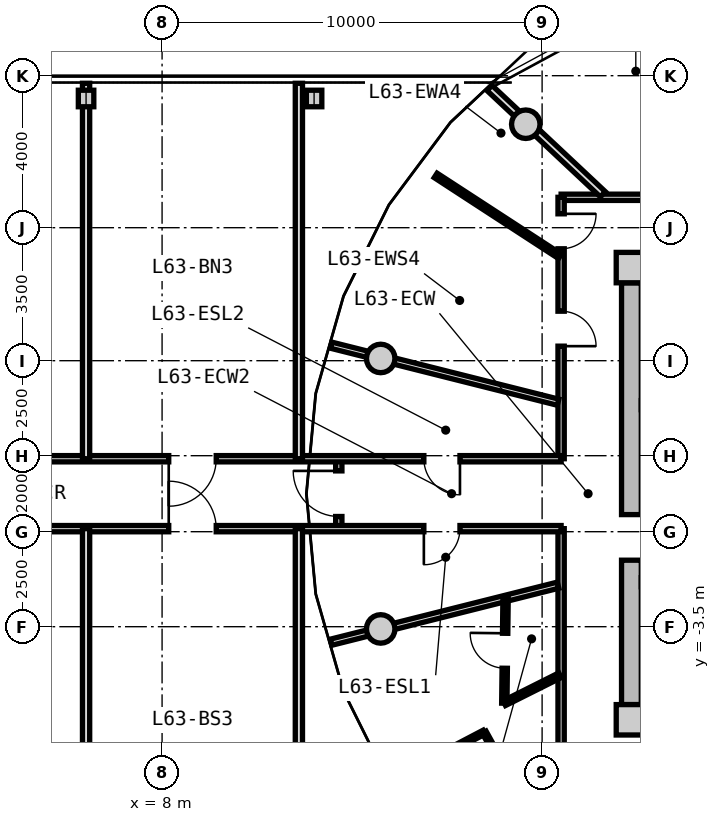
"""IFC4 building model, lengths in metres.
Left out: names, types, materials, properties, quantities, classifications, styles, units other than length and angle.
Written with IfcOpenShell. Run it as: python <this file> out.ifc"""

import sys

from ifc_helpers import new_model, si_unit, direction, frame, frame_2d, origin, origin_2d, place, context, subcontext, project, spatial, rectangle, circle, i_section, extrude, source, transform, mapped, element, fill, save


model = new_model("IFC4")
c1 = context("Model", 3, precision=1e-05, world=origin(), true_north=direction((0.0, 1.0)))
c2 = subcontext(c1, "Body", "Model", "MODEL_VIEW")
j1 = project(units=[si_unit("LENGTHUNIT", "METRE"), si_unit("PLANEANGLEUNIT", "RADIAN")], contexts=[c1])
p1 = place(None, origin())
s1 = spatial("IfcSite", under=j1, at=p1, CompositionType="ELEMENT")
p2 = place(p1, origin())
s2 = spatial("IfcBuilding", under=s1, at=p2, CompositionType="ELEMENT")
p3 = place(p2, frame((0.0, 0.0, 203.8)))
s3 = spatial("IfcBuildingStorey", under=s2, at=p3, CompositionType="ELEMENT", Elevation=203.8)
m1 = source(origin(), c2, "Body", "SweptSolid", [
    extrude(rectangle(XDim=0.8, YDim=0.8, at=origin_2d()), origin(), (0.0, 0.0, 1.0), 4.0),
])
for number, where, z_axis, x_axis in (
    (1, (20.35, -5.95, 0.0), (0.0, 0.0, 1.0), (1.0, 0.0, 0.0)),
    (2, (20.35, 5.95, 0.0), (0.0, 0.0, 1.0), (1.0, 0.0, 0.0)),
):
    element("IfcColumn", number, at=place(p3, frame(where, z_axis=z_axis, x_axis=x_axis)), inside=s3, PredefinedType="COLUMN", context=c2, shape_type="MappedRepresentation", body=[
        mapped(m1, transform((0.0, 0.0, 0.0), x_axis=(1.0, 0.0, 0.0), y_axis=(0.0, 1.0, 0.0), z_axis=(0.0, 0.0, 1.0), scale=1.0)),
    ])
m2 = source(origin(), c2, "Body", "SweptSolid", [
    extrude(rectangle(XDim=11.1, YDim=0.52, at=frame_2d((5.55, 0.0))), origin(), (0.0, 0.0, 1.0), 3.71),
])
p4 = place(p3, frame((20.35, -5.55, 0.0), z_axis=(0.0, 0.0, 1.0), x_axis=(0.0, 1.0, 0.0)))
e3 = element("IfcWall", 3, at=p4, inside=s3, PredefinedType="SHEAR", context=c2, shape_type="MappedRepresentation", body=[
    mapped(m2, transform((0.0, 0.0, 0.0), x_axis=(1.0, 0.0, 0.0), y_axis=(0.0, 1.0, 0.0), z_axis=(0.0, 0.0, 1.0), scale=1.0)),
])
p5 = place(p4, frame((3.8, 0.0, 0.0)))
e4 = element("IfcOpeningElement", 4, at=p5, cuts=e3, PredefinedType="OPENING", context=c2, shape_type="SweptSolid", body=[
    extrude(rectangle(XDim=1.2, YDim=2.15, at=frame_2d((0.6, 1.075))), frame((0.0, 0.27, 0.0), z_axis=(0.0, -1.0, 0.0), x_axis=(1.0, 0.0, 0.0)), (0.0, 0.0, 1.0), 0.54),
])
m3 = source(origin(), c2, "Body", "SweptSolid", [
    extrude(circle(Radius=0.375, at=origin_2d()), origin(), (0.0, 0.0, 1.0), 4.0),
])
for number, where, z_axis, x_axis in (
    (5, (17.57, 9.723, 0.0), (0.0, 0.0, 1.0), (1.0, 0.0, 0.0)),
    (6, (13.753, 3.559, 0.0), (0.0, 0.0, 1.0), (1.0, 0.0, 0.0)),
    (7, (13.753, -3.559, 0.0), (0.0, 0.0, 1.0), (1.0, 0.0, 0.0)),
):
    element("IfcColumn", number, at=place(p3, frame(where, z_axis=z_axis, x_axis=x_axis)), inside=s3, PredefinedType="COLUMN", context=c2, shape_type="MappedRepresentation", body=[
        mapped(m3, transform((0.0, 0.0, 0.0), x_axis=(1.0, 0.0, 0.0), y_axis=(0.0, 1.0, 0.0), z_axis=(0.0, 0.0, 1.0), scale=1.0)),
    ])
m4 = source(origin(), c2, "Body", "SweptSolid", [
    extrude(i_section(OverallWidth=0.407, OverallDepth=0.435, WebThickness=0.024, FlangeThickness=0.039, FilletRadius=0.015, at=origin_2d()), origin(), (0.0, 0.0, 1.0), 4.0),
])
for number, where, z_axis, x_axis in (
    (8, (6.0, 10.4, 0.0), (0.0, 0.0, 1.0), (1.0, 0.0, 0.0)),
    (9, (12.0, 10.4, 0.0), (0.0, 0.0, 1.0), (1.0, 0.0, 0.0)),
):
    element("IfcColumn", number, at=place(p3, frame(where, z_axis=z_axis, x_axis=x_axis)), inside=s3, PredefinedType="COLUMN", context=c2, shape_type="MappedRepresentation", body=[
        mapped(m4, transform((0.0, 0.0, 0.0), x_axis=(1.0, 0.0, 0.0), y_axis=(0.0, 1.0, 0.0), z_axis=(0.0, 0.0, 1.0), scale=1.0)),
    ])
m5 = source(origin(), c2, "Body", "SweptSolid", [
    extrude(rectangle(XDim=8.58, YDim=0.165, at=frame_2d((4.29, 0.0))), origin(), (0.0, 0.0, 1.0), 3.695),
])
p6 = place(p3, frame((18.5, 7.8, 0.0), z_axis=(0.0, 0.0, 1.0), x_axis=(1.0, 0.0, 0.0)))
e10 = element("IfcWall", 10, at=p6, inside=s3, PredefinedType="PARTITIONING", context=c2, shape_type="MappedRepresentation", body=[
    mapped(m5, transform((0.0, 0.0, 0.0), x_axis=(1.0, 0.0, 0.0), y_axis=(0.0, 1.0, 0.0), z_axis=(0.0, 0.0, 1.0), scale=1.0)),
])
p7 = place(p6, frame((2.515, 0.0, 0.0)))
e11 = element("IfcOpeningElement", 11, at=p7, cuts=e10, PredefinedType="OPENING", context=c2, shape_type="SweptSolid", body=[
    extrude(rectangle(XDim=1.05, YDim=2.15, at=frame_2d((0.525, 1.075))), frame((0.0, 0.093, 0.0), z_axis=(0.0, -1.0, 0.0), x_axis=(1.0, 0.0, 0.0)), (0.0, 0.0, 1.0), 0.185),
])
m6 = source(origin(), c2, "Body", "SweptSolid", [
    extrude(rectangle(XDim=6.88, YDim=0.165, at=frame_2d((3.44, 0.0))), origin(), (0.0, 0.0, 1.0), 3.695),
])
p8 = place(p3, frame((18.5, -7.8, 0.0), z_axis=(0.0, 0.0, 1.0), x_axis=(0.0, 1.0, 0.0)))
e12 = element("IfcWall", 12, at=p8, inside=s3, PredefinedType="PARTITIONING", context=c2, shape_type="MappedRepresentation", body=[
    mapped(m6, transform((0.0, 0.0, 0.0), x_axis=(1.0, 0.0, 0.0), y_axis=(0.0, 1.0, 0.0), z_axis=(0.0, 0.0, 1.0), scale=1.0)),
])
p9 = place(p3, frame((18.5, 0.92, 0.0), z_axis=(0.0, 0.0, 1.0), x_axis=(0.0, 1.0, 0.0)))
e13 = element("IfcWall", 13, at=p9, inside=s3, PredefinedType="PARTITIONING", context=c2, shape_type="MappedRepresentation", body=[
    mapped(m6, transform((0.0, 0.0, 0.0), x_axis=(1.0, 0.0, 0.0), y_axis=(0.0, 1.0, 0.0), z_axis=(0.0, 0.0, 1.0), scale=1.0)),
])
p10 = place(p9, frame((5.525, 0.0, 0.0)))
e14 = element("IfcOpeningElement", 14, at=p10, cuts=e13, PredefinedType="OPENING", context=c2, shape_type="SweptSolid", body=[
    extrude(rectangle(XDim=0.92, YDim=2.1, at=frame_2d((0.46, 1.05))), frame((0.0, 0.093, 0.0), z_axis=(0.0, -1.0, 0.0), x_axis=(1.0, 0.0, 0.0)), (0.0, 0.0, 1.0), 0.185),
])
p11 = place(p9, frame((2.962, 0.0, 0.0)))
e15 = element("IfcOpeningElement", 15, at=p11, cuts=e13, PredefinedType="OPENING", context=c2, shape_type="SweptSolid", body=[
    extrude(rectangle(XDim=0.92, YDim=2.1, at=frame_2d((0.46, 1.05))), frame((0.0, 0.093, 0.0), z_axis=(0.0, -1.0, 0.0), x_axis=(1.0, 0.0, 0.0)), (0.0, 0.0, 1.0), 0.185),
])
m7 = source(origin(), c2, "Body", "SweptSolid", [
    extrude(rectangle(XDim=6.157, YDim=0.165, at=frame_2d((3.079, 0.0))), origin(), (0.0, 0.0, 1.0), 3.295),
])
for number, where, z_axis, x_axis in (
    (16, (18.42, 2.407, 0.0), (0.0, 0.0, 1.0), (-0.97, 0.244, 0.0)),
    (17, (18.42, -2.407, 0.0), (0.0, 0.0, 1.0), (-0.97, -0.244, 0.0)),
):
    element("IfcWall", number, at=place(p3, frame(where, z_axis=z_axis, x_axis=x_axis)), inside=s3, PredefinedType="PARTITIONING", context=c2, shape_type="MappedRepresentation", body=[
        mapped(m7, transform((0.0, 0.0, 0.0), x_axis=(1.0, 0.0, 0.0), y_axis=(0.0, 1.0, 0.0), z_axis=(0.0, 0.0, 1.0), scale=1.0)),
    ])
m8 = source(origin(), c2, "Body", "SweptSolid", [
    extrude(rectangle(XDim=4.089, YDim=0.19, at=frame_2d((2.044, 0.0))), origin(), (0.0, 0.0, 1.0), 3.295),
])
p12 = place(p3, frame((19.598, 7.88, 0.0), z_axis=(0.0, 0.0, 1.0), x_axis=(-0.729401273609, 0.684086092577, 0.0)))
e18 = element("IfcWall", 18, at=p12, inside=s3, PredefinedType="PARTITIONING", context=c2, shape_type="MappedRepresentation", body=[
    mapped(m8, transform((0.0, 0.0, 0.0), x_axis=(1.0, 0.0, 0.0), y_axis=(0.0, 1.0, 0.0), z_axis=(0.0, 0.0, 1.0), scale=1.0)),
])
m9 = source(origin(), c2, "Body", "SweptSolid", [
    extrude(rectangle(XDim=3.904, YDim=0.14, at=frame_2d((1.952, 0.0))), origin(), (0.0, 0.0, 1.0), 3.695),
])
p13 = place(p3, frame((18.47, 6.246, 0.0), z_axis=(0.0, 0.0, 1.0), x_axis=(-0.838024687996, 0.545632314209, 0.0)))
e19 = element("IfcWall", 19, at=p13, inside=s3, PredefinedType="PARTITIONING", context=c2, shape_type="MappedRepresentation", body=[
    mapped(m9, transform((0.0, 0.0, 0.0), x_axis=(1.0, 0.0, 0.0), y_axis=(0.0, 1.0, 0.0), z_axis=(0.0, 0.0, 1.0), scale=1.0)),
])
m10 = source(origin(), c2, "Body", "SweptSolid", [
    extrude(rectangle(XDim=1.638, YDim=0.14, at=frame_2d((0.819, 0.0))), origin(), (0.0, 0.0, 1.0), 3.695),
])
p14 = place(p3, frame((18.47, -4.778, 0.0), z_axis=(0.0, 0.0, 1.0), x_axis=(-0.893919977945, -0.448226586707, 0.0)))
e20 = element("IfcWall", 20, at=p14, inside=s3, PredefinedType="PARTITIONING", context=c2, shape_type="MappedRepresentation", body=[
    mapped(m10, transform((0.0, 0.0, 0.0), x_axis=(1.0, 0.0, 0.0), y_axis=(0.0, 1.0, 0.0), z_axis=(0.0, 0.0, 1.0), scale=1.0)),
])
m11 = source(origin(), c2, "Body", "SweptSolid", [
    extrude(rectangle(XDim=2.759, YDim=0.14, at=frame_2d((1.379, 0.0))), origin(), (0.0, 0.0, 1.0), 3.695),
])
p15 = place(p3, frame((17.005, -5.513, 0.0), z_axis=(0.0, 0.0, 1.0), x_axis=(0.01194710728, 0.999928630767, 0.0)))
e21 = element("IfcWall", 21, at=p15, inside=s3, PredefinedType="PARTITIONING", context=c2, shape_type="MappedRepresentation", body=[
    mapped(m11, transform((0.0, 0.0, 0.0), x_axis=(1.0, 0.0, 0.0), y_axis=(0.0, 1.0, 0.0), z_axis=(0.0, 0.0, 1.0), scale=1.0)),
])
p16 = place(p15, frame((0.919, 0.0, 0.0)))
e22 = element("IfcOpeningElement", 22, at=p16, cuts=e21, PredefinedType="OPENING", context=c2, shape_type="SweptSolid", body=[
    extrude(rectangle(XDim=0.92, YDim=2.1, at=frame_2d((0.46, 1.05))), frame((0.0, 0.08, 0.0), z_axis=(0.0, -1.0, 0.0), x_axis=(1.0, 0.0, 0.0)), (0.0, 0.0, 1.0), 0.16),
])
m12 = source(origin(), c2, "Body", "SweptSolid", [
    extrude(rectangle(XDim=2.193, YDim=0.115, at=frame_2d((1.097, 0.0))), origin(), (0.0, 0.0, 1.0), 3.695),
])
p17 = place(p3, frame((16.475, -6.275, 0.0), z_axis=(0.0, 0.0, 1.0), x_axis=(-0.885783595046, -0.464098505435, 0.0)))
e23 = element("IfcWall", 23, at=p17, inside=s3, PredefinedType="PARTITIONING", context=c2, shape_type="MappedRepresentation", body=[
    mapped(m12, transform((0.0, 0.0, 0.0), x_axis=(1.0, 0.0, 0.0), y_axis=(0.0, 1.0, 0.0), z_axis=(0.0, 0.0, 1.0), scale=1.0)),
])
m13 = source(origin(), c2, "Body", "SweptSolid", [
    extrude(rectangle(XDim=3.45, YDim=0.115, at=frame_2d((1.725, 0.0))), origin(), (0.0, 0.0, 1.0), 3.695),
])
p18 = place(p3, frame((16.475, -6.275, 0.0), z_axis=(0.0, 0.0, 1.0), x_axis=(0.483659007882, -0.875256513312, 0.0)))
e24 = element("IfcWall", 24, at=p18, inside=s3, PredefinedType="PARTITIONING", context=c2, shape_type="MappedRepresentation", body=[
    mapped(m13, transform((0.0, 0.0, 0.0), x_axis=(1.0, 0.0, 0.0), y_axis=(0.0, 1.0, 0.0), z_axis=(0.0, 0.0, 1.0), scale=1.0)),
])
p19 = place(p18, frame((1.25, 0.0, 0.0)))
e25 = element("IfcOpeningElement", 25, at=p19, cuts=e24, PredefinedType="OPENING", context=c2, shape_type="SweptSolid", body=[
    extrude(rectangle(XDim=0.95, YDim=2.1, at=frame_2d((0.475, 1.05))), frame((0.0, 0.067, 0.0), z_axis=(0.0, -1.0, 0.0), x_axis=(1.0, 0.0, 0.0)), (0.0, 0.0, 1.0), 0.135),
])
m14 = source(origin(), c2, "Body", "SweptSolid", [
    extrude(rectangle(XDim=1.84, YDim=0.165, at=frame_2d((0.92, 0.0))), origin(), (0.0, 0.0, 1.0), 3.695),
])
p20 = place(p3, frame((12.65, -0.92, 0.0), z_axis=(0.0, 0.0, 1.0), x_axis=(0.0, 1.0, 0.0)))
e26 = element("IfcWall", 26, at=p20, inside=s3, PredefinedType="PARTITIONING", context=c2, shape_type="MappedRepresentation", body=[
    mapped(m14, transform((0.0, 0.0, 0.0), x_axis=(1.0, 0.0, 0.0), y_axis=(0.0, 1.0, 0.0), z_axis=(0.0, 0.0, 1.0), scale=1.0)),
])
p21 = place(p20, frame((0.32, 0.0, 0.0)))
e27 = element("IfcOpeningElement", 27, at=p21, cuts=e26, PredefinedType="OPENING", context=c2, shape_type="SweptSolid", body=[
    extrude(rectangle(XDim=1.2, YDim=2.15, at=frame_2d((0.6, 1.075))), frame((0.0, 0.093, 0.0), z_axis=(0.0, -1.0, 0.0), x_axis=(1.0, 0.0, 0.0)), (0.0, 0.0, 1.0), 0.185),
])
m15 = source(origin(), c2, "Body", "SweptSolid", [
    extrude(rectangle(XDim=37.0, YDim=0.165, at=frame_2d((18.5, 0.0))), origin(), (0.0, 0.0, 1.0), 3.695),
])
p22 = place(p3, frame((-18.5, -0.92, 0.0), z_axis=(0.0, 0.0, 1.0), x_axis=(1.0, 0.0, 0.0)))
e28 = element("IfcWall", 28, at=p22, inside=s3, PredefinedType="PARTITIONING", context=c2, shape_type="MappedRepresentation", body=[
    mapped(m15, transform((0.0, 0.0, 0.0), x_axis=(1.0, 0.0, 0.0), y_axis=(0.0, 1.0, 0.0), z_axis=(0.0, 0.0, 1.0), scale=1.0)),
])
p23 = place(p22, frame((2.662, 0.0, 0.0)))
e29 = element("IfcOpeningElement", 29, at=p23, cuts=e28, PredefinedType="OPENING", context=c2, shape_type="SweptSolid", body=[
    extrude(rectangle(XDim=0.95, YDim=2.1, at=frame_2d((0.475, 1.05))), frame((0.0, 0.093, 0.0), z_axis=(0.0, -1.0, 0.0), x_axis=(1.0, 0.0, 0.0)), (0.0, 0.0, 1.0), 0.185),
])
p24 = place(p22, frame((33.388, 0.0, 0.0)))
e30 = element("IfcOpeningElement", 30, at=p24, cuts=e28, PredefinedType="OPENING", context=c2, shape_type="SweptSolid", body=[
    extrude(rectangle(XDim=0.95, YDim=2.1, at=frame_2d((0.475, 1.05))), frame((0.0, 0.093, 0.0), z_axis=(0.0, -1.0, 0.0), x_axis=(1.0, 0.0, 0.0)), (0.0, 0.0, 1.0), 0.185),
])
p25 = place(p22, frame((9.075, 0.0, 0.0)))
e31 = element("IfcOpeningElement", 31, at=p25, cuts=e28, PredefinedType="OPENING", context=c2, shape_type="SweptSolid", body=[
    extrude(rectangle(XDim=1.25, YDim=2.2, at=frame_2d((0.625, 1.1))), frame((0.0, 0.093, 0.0), z_axis=(0.0, -1.0, 0.0), x_axis=(1.0, 0.0, 0.0)), (0.0, 0.0, 1.0), 0.185),
])
p26 = place(p22, frame((17.875, 0.0, 0.0)))
e32 = element("IfcOpeningElement", 32, at=p26, cuts=e28, PredefinedType="OPENING", context=c2, shape_type="SweptSolid", body=[
    extrude(rectangle(XDim=1.25, YDim=2.2, at=frame_2d((0.625, 1.1))), frame((0.0, 0.093, 0.0), z_axis=(0.0, -1.0, 0.0), x_axis=(1.0, 0.0, 0.0)), (0.0, 0.0, 1.0), 0.185),
])
p27 = place(p22, frame((26.675, 0.0, 0.0)))
e33 = element("IfcOpeningElement", 33, at=p27, cuts=e28, PredefinedType="OPENING", context=c2, shape_type="SweptSolid", body=[
    extrude(rectangle(XDim=1.25, YDim=2.2, at=frame_2d((0.625, 1.1))), frame((0.0, 0.093, 0.0), z_axis=(0.0, -1.0, 0.0), x_axis=(1.0, 0.0, 0.0)), (0.0, 0.0, 1.0), 0.185),
])
p28 = place(p3, frame((-18.5, 0.92, 0.0), z_axis=(0.0, 0.0, 1.0), x_axis=(1.0, 0.0, 0.0)))
e34 = element("IfcWall", 34, at=p28, inside=s3, PredefinedType="PARTITIONING", context=c2, shape_type="MappedRepresentation", body=[
    mapped(m15, transform((0.0, 0.0, 0.0), x_axis=(1.0, 0.0, 0.0), y_axis=(0.0, 1.0, 0.0), z_axis=(0.0, 0.0, 1.0), scale=1.0)),
])
p29 = place(p28, frame((2.662, 0.0, 0.0)))
e35 = element("IfcOpeningElement", 35, at=p29, cuts=e34, PredefinedType="OPENING", context=c2, shape_type="SweptSolid", body=[
    extrude(rectangle(XDim=0.95, YDim=2.1, at=frame_2d((0.475, 1.05))), frame((0.0, 0.093, 0.0), z_axis=(0.0, -1.0, 0.0), x_axis=(1.0, 0.0, 0.0)), (0.0, 0.0, 1.0), 0.185),
])
p30 = place(p28, frame((33.388, 0.0, 0.0)))
e36 = element("IfcOpeningElement", 36, at=p30, cuts=e34, PredefinedType="OPENING", context=c2, shape_type="SweptSolid", body=[
    extrude(rectangle(XDim=0.95, YDim=2.1, at=frame_2d((0.475, 1.05))), frame((0.0, 0.093, 0.0), z_axis=(0.0, -1.0, 0.0), x_axis=(1.0, 0.0, 0.0)), (0.0, 0.0, 1.0), 0.185),
])
p31 = place(p28, frame((7.64, 0.0, 0.0)))
e37 = element("IfcOpeningElement", 37, at=p31, cuts=e34, PredefinedType="OPENING", context=c2, shape_type="SweptSolid", body=[
    extrude(rectangle(XDim=0.92, YDim=2.1, at=frame_2d((0.46, 1.05))), frame((0.0, 0.093, 0.0), z_axis=(0.0, -1.0, 0.0), x_axis=(1.0, 0.0, 0.0)), (0.0, 0.0, 1.0), 0.185),
])
p32 = place(p28, frame((10.275, 0.0, 0.0)))
e38 = element("IfcOpeningElement", 38, at=p32, cuts=e34, PredefinedType="OPENING", context=c2, shape_type="SweptSolid", body=[
    extrude(rectangle(XDim=1.25, YDim=2.2, at=frame_2d((0.625, 1.1))), frame((0.0, 0.093, 0.0), z_axis=(0.0, -1.0, 0.0), x_axis=(1.0, 0.0, 0.0)), (0.0, 0.0, 1.0), 0.185),
])
p33 = place(p28, frame((17.875, 0.0, 0.0)))
e39 = element("IfcOpeningElement", 39, at=p33, cuts=e34, PredefinedType="OPENING", context=c2, shape_type="SweptSolid", body=[
    extrude(rectangle(XDim=1.25, YDim=2.2, at=frame_2d((0.625, 1.1))), frame((0.0, 0.093, 0.0), z_axis=(0.0, -1.0, 0.0), x_axis=(1.0, 0.0, 0.0)), (0.0, 0.0, 1.0), 0.185),
])
p34 = place(p28, frame((26.675, 0.0, 0.0)))
e40 = element("IfcOpeningElement", 40, at=p34, cuts=e34, PredefinedType="OPENING", context=c2, shape_type="SweptSolid", body=[
    extrude(rectangle(XDim=1.25, YDim=2.2, at=frame_2d((0.625, 1.1))), frame((0.0, 0.093, 0.0), z_axis=(0.0, -1.0, 0.0), x_axis=(1.0, 0.0, 0.0)), (0.0, 0.0, 1.0), 0.185),
])
m16 = source(origin(), c2, "Body", "SweptSolid", [
    extrude(rectangle(XDim=9.88, YDim=0.19, at=frame_2d((4.94, 0.0))), origin(), (0.0, 0.0, 1.0), 3.695),
])
for number, where, z_axis, x_axis in (
    (41, (11.6, -10.8, 0.0), (0.0, 0.0, 1.0), (0.0, 1.0, 0.0)),
    (42, (11.6, 0.92, 0.0), (0.0, 0.0, 1.0), (0.0, 1.0, 0.0)),
):
    element("IfcWall", number, at=place(p3, frame(where, z_axis=z_axis, x_axis=x_axis)), inside=s3, PredefinedType="PARTITIONING", context=c2, shape_type="MappedRepresentation", body=[
        mapped(m16, transform((0.0, 0.0, 0.0), x_axis=(1.0, 0.0, 0.0), y_axis=(0.0, 1.0, 0.0), z_axis=(0.0, 0.0, 1.0), scale=1.0)),
    ])
m17 = source(origin(), c2, "Body", "SweptSolid", [
    extrude(rectangle(XDim=9.88, YDim=0.19, at=frame_2d((4.94, 0.0))), origin(), (0.0, 0.0, 1.0), 2.995),
])
for number, where, z_axis, x_axis in (
    (43, (6.0, -10.8, 0.0), (0.0, 0.0, 1.0), (0.0, 1.0, 0.0)),
    (44, (6.0, 0.92, 0.0), (0.0, 0.0, 1.0), (0.0, 1.0, 0.0)),
):
    element("IfcWall", number, at=place(p3, frame(where, z_axis=z_axis, x_axis=x_axis)), inside=s3, PredefinedType="PARTITIONING", context=c2, shape_type="MappedRepresentation", body=[
        mapped(m17, transform((0.0, 0.0, 0.0), x_axis=(1.0, 0.0, 0.0), y_axis=(0.0, 1.0, 0.0), z_axis=(0.0, 0.0, 1.0), scale=1.0)),
    ])
m18 = source(origin(), c2, "Body", "SweptSolid", [
    extrude(rectangle(XDim=1.2, YDim=2.15, at=frame_2d((0.6, 1.075))), frame((0.0, 0.025, 0.0), z_axis=(0.0, -1.0, 0.0), x_axis=(1.0, 0.0, 0.0)), (0.0, 0.0, 1.0), 0.05),
])
p35 = place(p5, frame((1.2, 0.0, 0.0), z_axis=(0.0, 0.0, 1.0), x_axis=(-1.0, 0.0, 0.0)))
e45 = element("IfcDoor", 45, at=p35, inside=s3, OperationType="SINGLE_SWING_LEFT", PredefinedType="DOOR", context=c2, shape_type="MappedRepresentation", body=[
    mapped(m18, transform((0.0, 0.0, 0.0), x_axis=(1.0, 0.0, 0.0), y_axis=(0.0, 1.0, 0.0), z_axis=(0.0, 0.0, 1.0), scale=1.0)),
])
fill(e4, e45)
m19 = source(origin(), c2, "Body", "SweptSolid", [
    extrude(rectangle(XDim=0.95, YDim=2.1, at=frame_2d((0.475, 1.05))), frame((0.0, 0.025, 0.0), z_axis=(0.0, -1.0, 0.0), x_axis=(1.0, 0.0, 0.0)), (0.0, 0.0, 1.0), 0.05),
])
p36 = place(p24, frame((0.95, 0.0, 0.0), z_axis=(0.0, 0.0, 1.0), x_axis=(-1.0, 0.0, 0.0)))
e46 = element("IfcDoor", 46, at=p36, inside=s3, OperationType="SINGLE_SWING_RIGHT", PredefinedType="DOOR", context=c2, shape_type="MappedRepresentation", body=[
    mapped(m19, transform((0.0, 0.0, 0.0), x_axis=(1.0, 0.0, 0.0), y_axis=(0.0, 1.0, 0.0), z_axis=(0.0, 0.0, 1.0), scale=1.0)),
])
fill(e30, e46)
p37 = place(p30, frame((0.95, 0.0, 0.0), z_axis=(0.0, 0.0, 1.0), x_axis=(-1.0, 0.0, 0.0)))
e47 = element("IfcDoor", 47, at=p37, inside=s3, OperationType="SINGLE_SWING_LEFT", PredefinedType="DOOR", context=c2, shape_type="MappedRepresentation", body=[
    mapped(m19, transform((0.0, 0.0, 0.0), x_axis=(1.0, 0.0, 0.0), y_axis=(0.0, 1.0, 0.0), z_axis=(0.0, 0.0, 1.0), scale=1.0)),
])
fill(e36, e47)
m20 = source(origin(), c2, "Body", "SweptSolid", [
    extrude(rectangle(XDim=0.92, YDim=2.1, at=frame_2d((0.46, 1.05))), frame((0.0, 0.025, 0.0), z_axis=(0.0, -1.0, 0.0), x_axis=(1.0, 0.0, 0.0)), (0.0, 0.0, 1.0), 0.05),
])
p38 = place(p10, frame((0.92, 0.0, 0.0), z_axis=(0.0, 0.0, 1.0), x_axis=(-1.0, 0.0, 0.0)))
e48 = element("IfcDoor", 48, at=p38, inside=s3, OperationType="SINGLE_SWING_LEFT", PredefinedType="DOOR", context=c2, shape_type="MappedRepresentation", body=[
    mapped(m20, transform((0.0, 0.0, 0.0), x_axis=(1.0, 0.0, 0.0), y_axis=(0.0, 1.0, 0.0), z_axis=(0.0, 0.0, 1.0), scale=1.0)),
])
fill(e14, e48)
p39 = place(p11, frame((0.92, 0.0, 0.0), z_axis=(0.0, 0.0, 1.0), x_axis=(-1.0, 0.0, 0.0)))
e49 = element("IfcDoor", 49, at=p39, inside=s3, OperationType="SINGLE_SWING_RIGHT", PredefinedType="DOOR", context=c2, shape_type="MappedRepresentation", body=[
    mapped(m20, transform((0.0, 0.0, 0.0), x_axis=(1.0, 0.0, 0.0), y_axis=(0.0, 1.0, 0.0), z_axis=(0.0, 0.0, 1.0), scale=1.0)),
])
fill(e15, e49)
p40 = place(p16, origin())
e50 = element("IfcDoor", 50, at=p40, inside=s3, OperationType="SINGLE_SWING_RIGHT", PredefinedType="DOOR", context=c2, shape_type="MappedRepresentation", body=[
    mapped(m20, transform((0.0, 0.0, 0.0), x_axis=(1.0, 0.0, 0.0), y_axis=(0.0, 1.0, 0.0), z_axis=(0.0, 0.0, 1.0), scale=1.0)),
])
fill(e22, e50)
p41 = place(p21, origin())
e51 = element("IfcDoor", 51, at=p41, inside=s3, OperationType="SINGLE_SWING_RIGHT", PredefinedType="DOOR", context=c2, shape_type="MappedRepresentation", body=[
    mapped(m18, transform((0.0, 0.0, 0.0), x_axis=(1.0, 0.0, 0.0), y_axis=(0.0, 1.0, 0.0), z_axis=(0.0, 0.0, 1.0), scale=1.0)),
])
fill(e27, e51)
m21 = source(origin(), c2, "Body", "SweptSolid", [
    extrude(rectangle(XDim=1.25, YDim=2.2, at=frame_2d((0.625, 1.1))), frame((0.0, 0.025, 0.0), z_axis=(0.0, -1.0, 0.0), x_axis=(1.0, 0.0, 0.0)), (0.0, 0.0, 1.0), 0.05),
])
p42 = place(p27, origin())
e52 = element("IfcDoor", 52, at=p42, inside=s3, OperationType="SINGLE_SWING_LEFT", PredefinedType="DOOR", context=c2, shape_type="MappedRepresentation", body=[
    mapped(m21, transform((0.0, 0.0, 0.0), x_axis=(1.0, 0.0, 0.0), y_axis=(0.0, 1.0, 0.0), z_axis=(0.0, 0.0, 1.0), scale=1.0)),
])
fill(e33, e52)
p43 = place(p34, frame((1.25, 0.0, 0.0), z_axis=(0.0, 0.0, 1.0), x_axis=(-1.0, 0.0, 0.0)))
e53 = element("IfcDoor", 53, at=p43, inside=s3, OperationType="SINGLE_SWING_RIGHT", PredefinedType="DOOR", context=c2, shape_type="MappedRepresentation", body=[
    mapped(m21, transform((0.0, 0.0, 0.0), x_axis=(1.0, 0.0, 0.0), y_axis=(0.0, 1.0, 0.0), z_axis=(0.0, 0.0, 1.0), scale=1.0)),
])
fill(e40, e53)
save(model, sys.argv[1])
